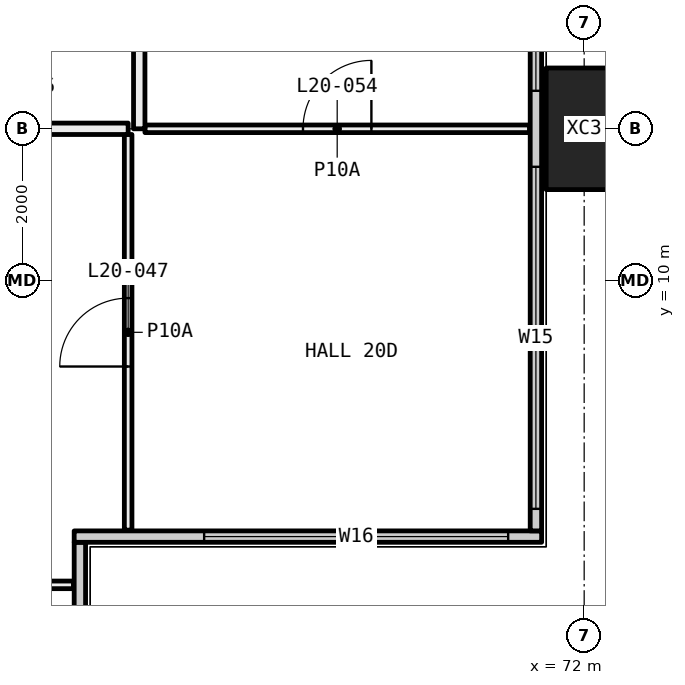
"""IFC4 building model, lengths in metres.
Left out: names, types, materials, properties, quantities, classifications, styles, units other than length and angle.
Written with IfcOpenShell. Run it as: python <this file> out.ifc"""

import sys

from ifc_helpers import new_model, si_unit, direction, frame, frame_2d, origin, origin_2d, place, context, subcontext, project, spatial, rectangle, hollow_rectangle, extrude, element, fill, save


model = new_model("IFC4")
c1 = context("Model", 3, precision=1e-05, world=origin(), true_north=direction((0.0, 1.0)))
c2 = subcontext(c1, "Body", "Model", "MODEL_VIEW")
j1 = project(units=[si_unit("LENGTHUNIT", "METRE"), si_unit("PLANEANGLEUNIT", "RADIAN")], contexts=[c1])
p1 = place(None, origin())
s1 = spatial("IfcSite", under=j1, at=p1, CompositionType="ELEMENT")
p2 = place(p1, origin())
s2 = spatial("IfcBuilding", under=s1, at=p2, CompositionType="ELEMENT")
p3 = place(p2, frame((0.0, 0.0, 81.75)))
s3 = spatial("IfcBuildingStorey", under=s2, at=p3, CompositionType="ELEMENT", Elevation=81.75)
p4 = place(p3, frame((72.0, 12.0, -0.4), z_axis=(0.0, 0.0, 1.0), x_axis=(0.0, 1.0, 0.0)))
e1 = element("IfcColumn", 1, at=p4, inside=s3, PredefinedType="COLUMN", context=c2, shape_type="SweptSolid", body=[
    extrude(hollow_rectangle(XDim=1.6, YDim=1.0, WallThickness=0.065, at=origin_2d()), origin(), (0.0, 0.0, 1.0), 3.45),
])
p5 = place(p3, frame((65.365, 0.71, 0.0), z_axis=(0.0, 0.0, 1.0), x_axis=(0.0, 1.0, 0.0)))
e2 = element("IfcWall", 2, at=p5, inside=s3, PredefinedType="ELEMENTEDWALL", context=c2, shape_type="SweptSolid", body=[
    extrude(rectangle(XDim=5.85, YDim=0.15, at=frame_2d((2.925, 0.0))), origin(), (0.0, 0.0, 1.0), 3.05),
])
p6 = place(p5, frame((0.29, 0.0, 0.45)))
e3 = element("IfcOpeningElement", 3, at=p6, cuts=e2, PredefinedType="OPENING", context=c2, shape_type="SweptSolid", body=[
    extrude(rectangle(XDim=4.0, YDim=2.55, at=frame_2d((2.0, 1.275))), frame((0.0, 0.085, 0.0), z_axis=(0.0, -1.0, 0.0), x_axis=(1.0, 0.0, 0.0)), (0.0, 0.0, 1.0), 0.17),
])
p7 = place(p3, frame((65.29, 6.635, 0.0), z_axis=(0.0, 0.0, 1.0), x_axis=(1.0, 0.0, 0.0)))
e4 = element("IfcWall", 4, at=p7, inside=s3, PredefinedType="ELEMENTEDWALL", context=c2, shape_type="SweptSolid", body=[
    extrude(rectangle(XDim=6.15, YDim=0.15, at=frame_2d((3.075, 0.0))), origin(), (0.0, 0.0, 1.0), 3.05),
])
p8 = place(p7, frame((1.71, 0.0, 0.45)))
e5 = element("IfcOpeningElement", 5, at=p8, cuts=e4, PredefinedType="OPENING", context=c2, shape_type="SweptSolid", body=[
    extrude(rectangle(XDim=4.0, YDim=2.55, at=frame_2d((2.0, 1.275))), frame((0.0, 0.085, 0.0), z_axis=(0.0, -1.0, 0.0), x_axis=(1.0, 0.0, 0.0)), (0.0, 0.0, 1.0), 0.17),
])
p9 = place(p3, frame((71.365, 6.71, 0.0), z_axis=(0.0, 0.0, 1.0), x_axis=(0.0, 1.0, 0.0)))
e6 = element("IfcWall", 6, at=p9, inside=s3, PredefinedType="ELEMENTEDWALL", context=c2, shape_type="SweptSolid", body=[
    extrude(rectangle(XDim=34.58, YDim=0.15, at=frame_2d((17.29, 0.0))), origin(), (0.0, 0.0, 1.0), 3.05),
])
p10 = place(p9, frame((0.29, 0.0, 0.45)))
e7 = element("IfcOpeningElement", 7, at=p10, cuts=e6, PredefinedType="OPENING", context=c2, shape_type="SweptSolid", body=[
    extrude(rectangle(XDim=4.5, YDim=2.55, at=frame_2d((2.25, 1.275))), frame((0.0, 0.085, 0.0), z_axis=(0.0, -1.0, 0.0), x_axis=(1.0, 0.0, 0.0)), (0.0, 0.0, 1.0), 0.17),
])
p11 = place(p9, frame((5.79, 0.0, 0.45)))
e8 = element("IfcOpeningElement", 8, at=p11, cuts=e6, PredefinedType="OPENING", context=c2, shape_type="SweptSolid", body=[
    extrude(rectangle(XDim=3.0, YDim=2.55, at=frame_2d((1.5, 1.275))), frame((0.0, 0.085, 0.0), z_axis=(0.0, -1.0, 0.0), x_axis=(1.0, 0.0, 0.0)), (0.0, 0.0, 1.0), 0.17),
])
p12 = place(p9, frame((13.79, 0.0, 0.45)))
e9 = element("IfcOpeningElement", 9, at=p12, cuts=e6, PredefinedType="OPENING", context=c2, shape_type="SweptSolid", body=[
    extrude(rectangle(XDim=3.0, YDim=2.55, at=frame_2d((1.5, 1.275))), frame((0.0, 0.085, 0.0), z_axis=(0.0, -1.0, 0.0), x_axis=(1.0, 0.0, 0.0)), (0.0, 0.0, 1.0), 0.17),
])
p13 = place(p9, frame((17.79, 0.0, 0.45)))
e10 = element("IfcOpeningElement", 10, at=p13, cuts=e6, PredefinedType="OPENING", context=c2, shape_type="SweptSolid", body=[
    extrude(rectangle(XDim=3.0, YDim=2.55, at=frame_2d((1.5, 1.275))), frame((0.0, 0.085, 0.0), z_axis=(0.0, -1.0, 0.0), x_axis=(1.0, 0.0, 0.0)), (0.0, 0.0, 1.0), 0.17),
])
p14 = place(p9, frame((26.79, 0.0, 0.45)))
e11 = element("IfcOpeningElement", 11, at=p14, cuts=e6, PredefinedType="OPENING", context=c2, shape_type="SweptSolid", body=[
    extrude(rectangle(XDim=2.0, YDim=2.55, at=frame_2d((1.0, 1.275))), frame((0.0, 0.085, 0.0), z_axis=(0.0, -1.0, 0.0), x_axis=(1.0, 0.0, 0.0)), (0.0, 0.0, 1.0), 0.17),
])
p15 = place(p9, frame((29.79, 0.0, 0.45)))
e12 = element("IfcOpeningElement", 12, at=p15, cuts=e6, PredefinedType="OPENING", context=c2, shape_type="SweptSolid", body=[
    extrude(rectangle(XDim=4.5, YDim=2.55, at=frame_2d((2.25, 1.275))), frame((0.0, 0.085, 0.0), z_axis=(0.0, -1.0, 0.0), x_axis=(1.0, 0.0, 0.0)), (0.0, 0.0, 1.0), 0.17),
])
p16 = place(p3, frame((65.28, 6.0, 0.0), z_axis=(0.0, 0.0, 1.0), x_axis=(-1.0, 0.0, 0.0)))
e13 = element("IfcWall", 13, at=p16, inside=s3, PredefinedType="PARTITIONING", context=c2, shape_type="SweptSolid", body=[
    extrude(rectangle(XDim=5.23, YDim=0.1, at=frame_2d((2.615, 0.0))), origin(), (0.0, 0.0, 1.0), 2.45),
])
p17 = place(p16, frame((2.165, 0.0, 0.0)))
e14 = element("IfcOpeningElement", 14, at=p17, cuts=e13, PredefinedType="OPENING", context=c2, shape_type="SweptSolid", body=[
    extrude(rectangle(XDim=0.9, YDim=2.1, at=frame_2d((0.45, 1.05))), frame((0.0, 0.06, 0.0), z_axis=(0.0, -1.0, 0.0), x_axis=(1.0, 0.0, 0.0)), (0.0, 0.0, 1.0), 0.12),
])
p18 = place(p3, frame((66.0, 6.72, 0.0), z_axis=(0.0, 0.0, 1.0), x_axis=(0.0, 1.0, 0.0)))
e15 = element("IfcWall", 15, at=p18, inside=s3, PredefinedType="PARTITIONING", context=c2, shape_type="SweptSolid", body=[
    extrude(rectangle(XDim=5.205, YDim=0.1, at=frame_2d((2.603, 0.0))), origin(), (0.0, 0.0, 1.0), 2.45),
])
p19 = place(p18, frame((2.153, 0.0, 0.0)))
e16 = element("IfcOpeningElement", 16, at=p19, cuts=e15, PredefinedType="OPENING", context=c2, shape_type="SweptSolid", body=[
    extrude(rectangle(XDim=0.9, YDim=2.1, at=frame_2d((0.45, 1.05))), frame((0.0, 0.06, 0.0), z_axis=(0.0, -1.0, 0.0), x_axis=(1.0, 0.0, 0.0)), (0.0, 0.0, 1.0), 0.12),
])
p20 = place(p3, frame((66.0, 12.0, 0.0), z_axis=(0.0, 0.0, 1.0), x_axis=(-1.0, 0.0, 0.0)))
e17 = element("IfcWall", 17, at=p20, inside=s3, PredefinedType="PARTITIONING", context=c2, shape_type="SweptSolid", body=[
    extrude(rectangle(XDim=3.0, YDim=0.15, at=frame_2d((1.5, 0.0))), origin(), (0.0, 0.0, 1.0), 2.45),
])
p21 = place(p20, frame((1.05, 0.0, 0.0)))
e18 = element("IfcOpeningElement", 18, at=p21, cuts=e17, PredefinedType="OPENING", context=c2, shape_type="SweptSolid", body=[
    extrude(rectangle(XDim=0.9, YDim=2.1, at=frame_2d((0.45, 1.05))), frame((0.0, 0.085, 0.0), z_axis=(0.0, -1.0, 0.0), x_axis=(1.0, 0.0, 0.0)), (0.0, 0.0, 1.0), 0.17),
])
p22 = place(p3, frame((71.28, 12.0, 0.0), z_axis=(0.0, 0.0, 1.0), x_axis=(-1.0, 0.0, 0.0)))
e19 = element("IfcWall", 19, at=p22, inside=s3, PredefinedType="PARTITIONING", context=c2, shape_type="SweptSolid", body=[
    extrude(rectangle(XDim=5.059, YDim=0.1, at=frame_2d((2.53, 0.0))), origin(), (0.0, 0.0, 1.0), 2.45),
])
p23 = place(p22, frame((2.08, 0.0, 0.0)))
e20 = element("IfcOpeningElement", 20, at=p23, cuts=e19, PredefinedType="OPENING", context=c2, shape_type="SweptSolid", body=[
    extrude(rectangle(XDim=0.9, YDim=2.1, at=frame_2d((0.45, 1.05))), frame((0.0, 0.06, 0.0), z_axis=(0.0, -1.0, 0.0), x_axis=(1.0, 0.0, 0.0)), (0.0, 0.0, 1.0), 0.12),
])
p24 = place(p3, frame((66.146, 15.814, 0.0), z_axis=(0.0, 0.0, 1.0), x_axis=(0.0, -1.0, 0.0)))
e21 = element("IfcWall", 21, at=p24, inside=s3, PredefinedType="PARTITIONING", context=c2, shape_type="SweptSolid", body=[
    extrude(rectangle(XDim=3.814, YDim=0.15, at=frame_2d((1.907, 0.0))), origin(), (0.0, 0.0, 1.0), 2.45),
])
p25 = place(p8, origin())
e22 = element("IfcWindow", 22, at=p25, inside=s3, PartitioningType="SINGLE_PANEL", PredefinedType="WINDOW", context=c2, shape_type="SweptSolid", body=[
    extrude(rectangle(XDim=4.0, YDim=2.55, at=frame_2d((2.0, 1.275))), frame((0.0, 0.03, 0.0), z_axis=(0.0, -1.0, 0.0), x_axis=(1.0, 0.0, 0.0)), (0.0, 0.0, 1.0), 0.06),
])
fill(e5, e22)
p26 = place(p10, origin())
e23 = element("IfcWindow", 23, at=p26, inside=s3, PartitioningType="SINGLE_PANEL", PredefinedType="WINDOW", context=c2, shape_type="SweptSolid", body=[
    extrude(rectangle(XDim=4.5, YDim=2.55, at=frame_2d((2.25, 1.275))), frame((0.0, 0.03, 0.0), z_axis=(0.0, -1.0, 0.0), x_axis=(1.0, 0.0, 0.0)), (0.0, 0.0, 1.0), 0.06),
])
fill(e7, e23)
p27 = place(p11, origin())
e24 = element("IfcWindow", 24, at=p27, inside=s3, PartitioningType="SINGLE_PANEL", PredefinedType="WINDOW", context=c2, shape_type="SweptSolid", body=[
    extrude(rectangle(XDim=3.0, YDim=2.55, at=frame_2d((1.5, 1.275))), frame((0.0, 0.03, 0.0), z_axis=(0.0, -1.0, 0.0), x_axis=(1.0, 0.0, 0.0)), (0.0, 0.0, 1.0), 0.06),
])
fill(e8, e24)
p28 = place(p19, origin())
e25 = element("IfcDoor", 25, at=p28, inside=s3, OperationType="SINGLE_SWING_RIGHT", PredefinedType="DOOR", context=c2, shape_type="SweptSolid", body=[
    extrude(rectangle(XDim=0.9, YDim=2.1, at=frame_2d((0.45, 1.05))), frame((0.0, 0.025, 0.0), z_axis=(0.0, -1.0, 0.0), x_axis=(1.0, 0.0, 0.0)), (0.0, 0.0, 1.0), 0.05),
])
fill(e16, e25)
p29 = place(p23, frame((0.9, 0.0, 0.0), x_axis=(-1.0, 0.0, 0.0)))
e26 = element("IfcDoor", 26, at=p29, inside=s3, OperationType="SINGLE_SWING_LEFT", PredefinedType="DOOR", context=c2, shape_type="SweptSolid", body=[
    extrude(rectangle(XDim=0.9, YDim=2.1, at=frame_2d((0.45, 1.05))), frame((0.0, 0.025, 0.0), z_axis=(0.0, -1.0, 0.0), x_axis=(1.0, 0.0, 0.0)), (0.0, 0.0, 1.0), 0.05),
])
fill(e20, e26)
save(model, sys.argv[1])
